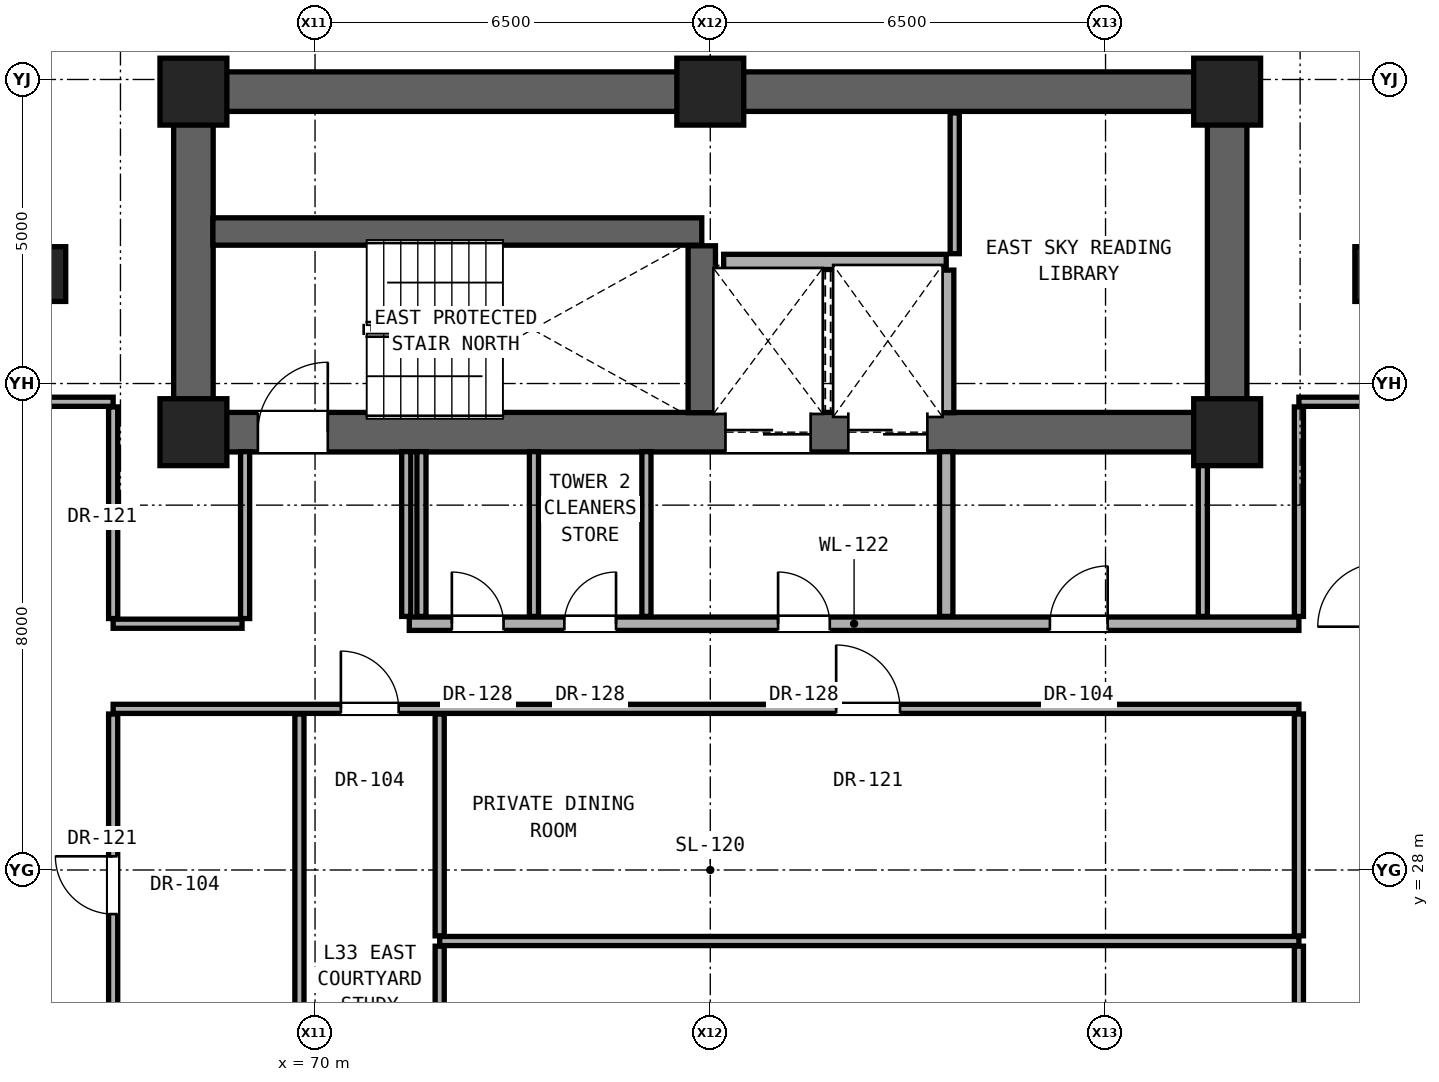
"""IFC4 building model, lengths in metres.
Left out: names, types, materials, properties, quantities, classifications, styles, units other than length and angle.
Written with IfcOpenShell. Run it as: python <this file> out.ifc"""

import sys

from ifc_helpers import new_model, si_unit, direction, frame, frame_2d, origin, origin_2d, place, context, subcontext, project, spatial, rectangle, extrude, element, fill, save


model = new_model("IFC4")
c1 = context("Model", 3, precision=1e-05, world=origin(), true_north=direction((0.0, 1.0)))
c2 = subcontext(c1, "Body", "Model", "MODEL_VIEW")
j1 = project(units=[si_unit("LENGTHUNIT", "METRE"), si_unit("PLANEANGLEUNIT", "RADIAN")], contexts=[c1])
p1 = place(None, origin())
s1 = spatial("IfcSite", under=j1, at=p1, CompositionType="ELEMENT")
p2 = place(p1, origin())
s2 = spatial("IfcBuilding", under=s1, at=p2, CompositionType="ELEMENT")
p3 = place(p2, frame((0.0, 0.0, 118.1)))
s3 = spatial("IfcBuildingStorey", under=s2, at=p3, CompositionType="ELEMENT", Elevation=118.1)
for number, where, z_axis, x_axis in (
    (1, (68.0, 35.2, 0.0), (0.0, 0.0, 1.0), (1.0, 0.0, 0.0)),
    (2, (85.0, 35.2, 0.0), (0.0, 0.0, 1.0), (1.0, 0.0, 0.0)),
    (3, (68.0, 40.8, 0.0), (0.0, 0.0, 1.0), (1.0, 0.0, 0.0)),
    (4, (76.5, 40.8, 0.0), (0.0, 0.0, 1.0), (1.0, 0.0, 0.0)),
    (5, (85.0, 40.8, 0.0), (0.0, 0.0, 1.0), (1.0, 0.0, 0.0)),
):
    element("IfcColumn", number, at=place(p3, frame(where, z_axis=z_axis, x_axis=x_axis)), inside=s3, PredefinedType="COLUMN", context=c2, shape_type="SweptSolid", body=[
        extrude(rectangle(XDim=1.1, YDim=1.1, at=origin_2d()), origin(), (0.0, 0.0, 1.0), 3.3),
    ])
for number, where, z_axis, x_axis in (
    (6, (65.6, 37.8, 0.0), (0.0, 0.0, 1.0), (1.0, 0.0, 0.0)),
    (7, (87.4, 37.8, 0.0), (0.0, 0.0, 1.0), (1.0, 0.0, 0.0)),
):
    element("IfcColumn", number, at=place(p3, frame(where, z_axis=z_axis, x_axis=x_axis)), inside=s3, PredefinedType="PILASTER", context=c2, shape_type="SweptSolid", body=[
        extrude(rectangle(XDim=0.6, YDim=0.9, at=origin_2d()), origin(), (0.0, 0.0, 1.0), 3.3),
    ])
p4 = place(p3, frame((68.0, 40.8, 0.0), z_axis=(0.0, 0.0, 1.0), x_axis=(1.0, 0.0, 0.0)))
e8 = element("IfcWall", 8, at=p4, inside=s3, PredefinedType="SHEAR", context=c2, shape_type="SweptSolid", body=[
    extrude(rectangle(XDim=17.0, YDim=0.65, at=frame_2d((8.5, 0.0))), origin(), (0.0, 0.0, 1.0), 3.08),
])
for number, where, z_axis, x_axis in (
    (9, (68.0, 35.2, 0.0), (0.0, 0.0, 1.0), (0.0, 1.0, 0.0)),
    (10, (85.0, 35.2, 0.0), (0.0, 0.0, 1.0), (0.0, 1.0, 0.0)),
):
    element("IfcWall", number, at=place(p3, frame(where, z_axis=z_axis, x_axis=x_axis)), inside=s3, PredefinedType="SHEAR", context=c2, shape_type="SweptSolid", body=[
        extrude(rectangle(XDim=5.6, YDim=0.65, at=frame_2d((2.8, 0.0))), origin(), (0.0, 0.0, 1.0), 3.08),
    ])
p5 = place(p3, frame((68.0, 35.2, 0.0), z_axis=(0.0, 0.0, 1.0), x_axis=(1.0, 0.0, 0.0)))
e11 = element("IfcWall", 11, at=p5, inside=s3, PredefinedType="SHEAR", context=c2, shape_type="SweptSolid", body=[
    extrude(rectangle(XDim=17.0, YDim=0.65, at=frame_2d((8.5, 0.0))), origin(), (0.0, 0.0, 1.0), 3.08),
])
p6 = place(p5, frame((1.06, 0.0, 0.0)))
e12 = element("IfcOpeningElement", 12, at=p6, cuts=e11, PredefinedType="OPENING", context=c2, shape_type="SweptSolid", body=[
    extrude(rectangle(XDim=1.15, YDim=2.2, at=frame_2d((0.575, 1.1))), frame((0.0, 0.335, 0.0), z_axis=(0.0, -1.0, 0.0), x_axis=(1.0, 0.0, 0.0)), (0.0, 0.0, 1.0), 0.67),
])
p7 = place(p5, frame((8.75, 0.0, 0.0)))
e13 = element("IfcOpeningElement", 13, at=p7, cuts=e11, PredefinedType="OPENING", context=c2, shape_type="SweptSolid", body=[
    extrude(rectangle(XDim=1.4, YDim=2.35, at=frame_2d((0.7, 1.175))), frame((0.0, 0.335, 0.0), z_axis=(0.0, -1.0, 0.0), x_axis=(1.0, 0.0, 0.0)), (0.0, 0.0, 1.0), 0.67),
])
p8 = place(p5, frame((10.77, 0.0, 0.0)))
e14 = element("IfcOpeningElement", 14, at=p8, cuts=e11, PredefinedType="OPENING", context=c2, shape_type="SweptSolid", body=[
    extrude(rectangle(XDim=1.3, YDim=2.3, at=frame_2d((0.65, 1.15))), frame((0.0, 0.335, 0.0), z_axis=(0.0, -1.0, 0.0), x_axis=(1.0, 0.0, 0.0)), (0.0, 0.0, 1.0), 0.67),
])
p9 = place(p3, frame((72.05, 26.832, 0.0), z_axis=(0.0, 0.0, 1.0), x_axis=(1.0, 0.0, 0.0)))
e15 = element("IfcWall", 15, at=p9, inside=s3, PredefinedType="PARTITIONING", context=c2, shape_type="SweptSolid", body=[
    extrude(rectangle(XDim=14.13, YDim=0.15, at=frame_2d((7.065, 0.0))), origin(), (0.0, 0.0, 1.0), 2.216),
])
p10 = place(p3, frame((66.68, 30.65, 0.0), z_axis=(0.0, 0.0, 1.0), x_axis=(1.0, 0.0, 0.0)))
e16 = element("IfcWall", 16, at=p10, inside=s3, PredefinedType="PARTITIONING", context=c2, shape_type="SweptSolid", body=[
    extrude(rectangle(XDim=19.5, YDim=0.15, at=frame_2d((9.75, 0.0))), origin(), (0.0, 0.0, 1.0), 2.216),
])
p11 = place(p10, frame((3.745, 0.0, 0.0)))
e17 = element("IfcOpeningElement", 17, at=p11, cuts=e16, PredefinedType="OPENING", context=c2, shape_type="SweptSolid", body=[
    extrude(rectangle(XDim=0.95, YDim=2.15, at=frame_2d((0.475, 1.075))), frame((0.0, 0.085, 0.0), z_axis=(0.0, -1.0, 0.0), x_axis=(1.0, 0.0, 0.0)), (0.0, 0.0, 1.0), 0.17),
])
p12 = place(p10, frame((11.89, 0.0, 0.0)))
e18 = element("IfcOpeningElement", 18, at=p12, cuts=e16, PredefinedType="OPENING", context=c2, shape_type="SweptSolid", body=[
    extrude(rectangle(XDim=1.05, YDim=2.2, at=frame_2d((0.525, 1.1))), frame((0.0, 0.085, 0.0), z_axis=(0.0, -1.0, 0.0), x_axis=(1.0, 0.0, 0.0)), (0.0, 0.0, 1.0), 0.17),
])
p13 = place(p3, frame((66.68, 32.05, 0.0), z_axis=(0.0, 0.0, 1.0), x_axis=(1.0, 0.0, 0.0)))
e19 = element("IfcWall", 19, at=p13, inside=s3, PredefinedType="PARTITIONING", context=c2, shape_type="SweptSolid", body=[
    extrude(rectangle(XDim=2.12, YDim=0.15, at=frame_2d((1.06, 0.0))), origin(), (0.0, 0.0, 1.0), 2.216),
])
p14 = place(p3, frame((71.55, 32.05, 0.0), z_axis=(0.0, 0.0, 1.0), x_axis=(1.0, 0.0, 0.0)))
e20 = element("IfcWall", 20, at=p14, inside=s3, PredefinedType="SOLIDWALL", context=c2, shape_type="SweptSolid", body=[
    extrude(rectangle(XDim=14.63, YDim=0.22, at=frame_2d((7.315, 0.0))), origin(), (0.0, 0.0, 1.0), 2.216),
])
p15 = place(p14, frame((6.065, 0.0, 0.0)))
e21 = element("IfcOpeningElement", 21, at=p15, cuts=e20, PredefinedType="OPENING", context=c2, shape_type="SweptSolid", body=[
    extrude(rectangle(XDim=0.85, YDim=2.01, at=frame_2d((0.425, 1.005))), frame((0.0, 0.12, 0.0), z_axis=(0.0, -1.0, 0.0), x_axis=(1.0, 0.0, 0.0)), (0.0, 0.0, 1.0), 0.24),
])
p16 = place(p14, frame((10.535, 0.0, 0.0)))
e22 = element("IfcOpeningElement", 22, at=p16, cuts=e20, PredefinedType="OPENING", context=c2, shape_type="SweptSolid", body=[
    extrude(rectangle(XDim=0.95, YDim=2.15, at=frame_2d((0.475, 1.075))), frame((0.0, 0.12, 0.0), z_axis=(0.0, -1.0, 0.0), x_axis=(1.0, 0.0, 0.0)), (0.0, 0.0, 1.0), 0.24),
])
p17 = place(p14, frame((0.7, 0.0, 0.0)))
e23 = element("IfcOpeningElement", 23, at=p17, cuts=e20, PredefinedType="OPENING", context=c2, shape_type="SweptSolid", body=[
    extrude(rectangle(XDim=0.85, YDim=2.01, at=frame_2d((0.425, 1.005))), frame((0.0, 0.12, 0.0), z_axis=(0.0, -1.0, 0.0), x_axis=(1.0, 0.0, 0.0)), (0.0, 0.0, 1.0), 0.24),
])
p18 = place(p14, frame((2.55, 0.0, 0.0)))
e24 = element("IfcOpeningElement", 24, at=p18, cuts=e20, PredefinedType="OPENING", context=c2, shape_type="SweptSolid", body=[
    extrude(rectangle(XDim=0.85, YDim=2.01, at=frame_2d((0.425, 1.005))), frame((0.0, 0.12, 0.0), z_axis=(0.0, -1.0, 0.0), x_axis=(1.0, 0.0, 0.0)), (0.0, 0.0, 1.0), 0.24),
])
p19 = place(p3, frame((65.32, 35.7, 0.0), z_axis=(0.0, 0.0, 1.0), x_axis=(1.0, 0.0, 0.0)))
e25 = element("IfcWall", 25, at=p19, inside=s3, PredefinedType="PARTITIONING", context=c2, shape_type="SweptSolid", body=[
    extrude(rectangle(XDim=1.36, YDim=0.15, at=frame_2d((0.68, 0.0))), origin(), (0.0, 0.0, 1.0), 3.08),
])
p20 = place(p3, frame((86.18, 35.7, 0.0), z_axis=(0.0, 0.0, 1.0), x_axis=(1.0, 0.0, 0.0)))
e26 = element("IfcWall", 26, at=p20, inside=s3, PredefinedType="PARTITIONING", context=c2, shape_type="SweptSolid", body=[
    extrude(rectangle(XDim=1.36, YDim=0.15, at=frame_2d((0.68, 0.0))), origin(), (0.0, 0.0, 1.0), 3.08),
])
p21 = place(p3, frame((76.72, 38.0, 0.0), z_axis=(0.0, 0.0, 1.0), x_axis=(1.0, 0.0, 0.0)))
e27 = element("IfcWall", 27, at=p21, inside=s3, PredefinedType="SOLIDWALL", context=c2, shape_type="SweptSolid", body=[
    extrude(rectangle(XDim=3.66, YDim=0.25, at=frame_2d((1.83, 0.0))), origin(), (0.0, 0.0, 1.0), 3.08),
])
p22 = place(p3, frame((68.32, 38.5, 0.0), z_axis=(0.0, 0.0, 1.0), x_axis=(1.0, 0.0, 0.0)))
e28 = element("IfcWall", 28, at=p22, inside=s3, PredefinedType="SHEAR", context=c2, shape_type="SweptSolid", body=[
    extrude(rectangle(XDim=8.04, YDim=0.45, at=frame_2d((4.02, 0.0))), origin(), (0.0, 0.0, 1.0), 3.08),
])
p23 = place(p3, frame((66.68, 24.935, 0.0), z_axis=(0.0, 0.0, 1.0), x_axis=(0.0, 1.0, 0.0)))
e29 = element("IfcWall", 29, at=p23, inside=s3, PredefinedType="PARTITIONING", context=c2, shape_type="SweptSolid", body=[
    extrude(rectangle(XDim=5.63, YDim=0.15, at=frame_2d((2.815, 0.0))), origin(), (0.0, 0.0, 1.0), 2.376),
])
p24 = place(p23, frame((2.34, 0.0, 0.0)))
e30 = element("IfcOpeningElement", 30, at=p24, cuts=e29, PredefinedType="OPENING", context=c2, shape_type="SweptSolid", body=[
    extrude(rectangle(XDim=0.95, YDim=2.15, at=frame_2d((0.475, 1.075))), frame((0.0, 0.085, 0.0), z_axis=(0.0, -1.0, 0.0), x_axis=(1.0, 0.0, 0.0)), (0.0, 0.0, 1.0), 0.17),
])
p25 = place(p3, frame((66.68, 32.135, 0.0), z_axis=(0.0, 0.0, 1.0), x_axis=(0.0, 1.0, 0.0)))
e31 = element("IfcWall", 31, at=p25, inside=s3, PredefinedType="PARTITIONING", context=c2, shape_type="SweptSolid", body=[
    extrude(rectangle(XDim=3.48, YDim=0.15, at=frame_2d((1.74, 0.0))), origin(), (0.0, 0.0, 1.0), 2.472),
])
p26 = place(p3, frame((68.85, 32.135, 0.0), z_axis=(0.0, 0.0, 1.0), x_axis=(0.0, 1.0, 0.0)))
e32 = element("IfcWall", 32, at=p26, inside=s3, PredefinedType="PARTITIONING", context=c2, shape_type="SweptSolid", body=[
    extrude(rectangle(XDim=2.745, YDim=0.15, at=frame_2d((1.373, 0.0))), origin(), (0.0, 0.0, 1.0), 3.08),
])
p27 = place(p3, frame((69.743, 24.935, 0.0), z_axis=(0.0, 0.0, 1.0), x_axis=(0.0, 1.0, 0.0)))
e33 = element("IfcWall", 33, at=p27, inside=s3, PredefinedType="PARTITIONING", context=c2, shape_type="SweptSolid", body=[
    extrude(rectangle(XDim=5.63, YDim=0.15, at=frame_2d((2.815, 0.0))), origin(), (0.0, 0.0, 1.0), 2.216),
])
for number, where, z_axis, x_axis in (
    (34, (71.5, 32.17, 0.0), (0.0, 0.0, 1.0), (0.0, 1.0, 0.0)),
    (35, (71.75, 32.17, 0.0), (0.0, 0.0, 1.0), (0.0, 1.0, 0.0)),
):
    element("IfcWall", number, at=place(p3, frame(where, z_axis=z_axis, x_axis=x_axis)), inside=s3, PredefinedType="PARTITIONING", context=c2, shape_type="SweptSolid", body=[
        extrude(rectangle(XDim=2.71, YDim=0.15, at=frame_2d((1.355, 0.0))), origin(), (0.0, 0.0, 1.0), 3.08),
    ])
p28 = place(p3, frame((72.05, 22.435, 0.0), z_axis=(0.0, 0.0, 1.0), x_axis=(0.0, 1.0, 0.0)))
e36 = element("IfcWall", 36, at=p28, inside=s3, PredefinedType="PARTITIONING", context=c2, shape_type="SweptSolid", body=[
    extrude(rectangle(XDim=4.312, YDim=0.15, at=frame_2d((2.156, 0.0))), origin(), (0.0, 0.0, 1.0), 3.08),
])
p29 = place(p3, frame((72.05, 26.917, 0.0), z_axis=(0.0, 0.0, 1.0), x_axis=(0.0, 1.0, 0.0)))
e37 = element("IfcWall", 37, at=p29, inside=s3, PredefinedType="PARTITIONING", context=c2, shape_type="SweptSolid", body=[
    extrude(rectangle(XDim=3.648, YDim=0.15, at=frame_2d((1.824, 0.0))), origin(), (0.0, 0.0, 1.0), 2.216),
])
for number, where, z_axis, x_axis in (
    (38, (73.6, 32.17, 0.0), (0.0, 0.0, 1.0), (0.0, 1.0, 0.0)),
    (39, (75.45, 32.17, 0.0), (0.0, 0.0, 1.0), (0.0, 1.0, 0.0)),
):
    element("IfcWall", number, at=place(p3, frame(where, z_axis=z_axis, x_axis=x_axis)), inside=s3, PredefinedType="PARTITIONING", context=c2, shape_type="SweptSolid", body=[
        extrude(rectangle(XDim=2.71, YDim=0.15, at=frame_2d((1.355, 0.0))), origin(), (0.0, 0.0, 1.0), 3.08),
    ])
p30 = place(p3, frame((76.36, 35.52, 0.0), z_axis=(0.0, 0.0, 1.0), x_axis=(0.0, 1.0, 0.0)))
e40 = element("IfcWall", 40, at=p30, inside=s3, PredefinedType="SHEAR", context=c2, shape_type="SweptSolid", body=[
    extrude(rectangle(XDim=2.745, YDim=0.45, at=frame_2d((1.373, 0.0))), origin(), (0.0, 0.0, 1.0), 3.08),
])
p31 = place(p3, frame((80.38, 32.17, 0.0), z_axis=(0.0, 0.0, 1.0), x_axis=(0.0, 1.0, 0.0)))
e41 = element("IfcWall", 41, at=p31, inside=s3, PredefinedType="SOLIDWALL", context=c2, shape_type="SweptSolid", body=[
    extrude(rectangle(XDim=2.71, YDim=0.22, at=frame_2d((1.355, 0.0))), origin(), (0.0, 0.0, 1.0), 3.08),
])
p32 = place(p3, frame((80.38, 35.52, 0.0), z_axis=(0.0, 0.0, 1.0), x_axis=(0.0, 1.0, 0.0)))
e42 = element("IfcWall", 42, at=p32, inside=s3, PredefinedType="SOLIDWALL", context=c2, shape_type="SweptSolid", body=[
    extrude(rectangle(XDim=2.345, YDim=0.25, at=frame_2d((1.172, 0.0))), origin(), (0.0, 0.0, 1.0), 3.08),
])
p33 = place(p3, frame((80.52, 38.135, 0.0), z_axis=(0.0, 0.0, 1.0), x_axis=(0.0, 1.0, 0.0)))
e43 = element("IfcWall", 43, at=p33, inside=s3, PredefinedType="PARTITIONING", context=c2, shape_type="SweptSolid", body=[
    extrude(rectangle(XDim=2.315, YDim=0.15, at=frame_2d((1.157, 0.0))), origin(), (0.0, 0.0, 1.0), 3.08),
])
p34 = place(p3, frame((84.6, 32.17, 0.0), z_axis=(0.0, 0.0, 1.0), x_axis=(0.0, 1.0, 0.0)))
e44 = element("IfcWall", 44, at=p34, inside=s3, PredefinedType="PARTITIONING", context=c2, shape_type="SweptSolid", body=[
    extrude(rectangle(XDim=2.71, YDim=0.15, at=frame_2d((1.355, 0.0))), origin(), (0.0, 0.0, 1.0), 3.08),
])
p35 = place(p3, frame((86.18, 22.435, 0.0), z_axis=(0.0, 0.0, 1.0), x_axis=(0.0, 1.0, 0.0)))
e45 = element("IfcWall", 45, at=p35, inside=s3, PredefinedType="PARTITIONING", context=c2, shape_type="SweptSolid", body=[
    extrude(rectangle(XDim=4.312, YDim=0.15, at=frame_2d((2.156, 0.0))), origin(), (0.0, 0.0, 1.0), 3.08),
])
p36 = place(p3, frame((86.18, 26.917, 0.0), z_axis=(0.0, 0.0, 1.0), x_axis=(0.0, 1.0, 0.0)))
e46 = element("IfcWall", 46, at=p36, inside=s3, PredefinedType="PARTITIONING", context=c2, shape_type="SweptSolid", body=[
    extrude(rectangle(XDim=3.648, YDim=0.15, at=frame_2d((1.824, 0.0))), origin(), (0.0, 0.0, 1.0), 2.376),
])
p37 = place(p3, frame((86.18, 32.17, 0.0), z_axis=(0.0, 0.0, 1.0), x_axis=(0.0, 1.0, 0.0)))
e47 = element("IfcWall", 47, at=p37, inside=s3, PredefinedType="PARTITIONING", context=c2, shape_type="SweptSolid", body=[
    extrude(rectangle(XDim=3.445, YDim=0.15, at=frame_2d((1.723, 0.0))), origin(), (0.0, 0.0, 1.0), 2.472),
])
p38 = place(p6, origin())
e48 = element("IfcDoor", 48, at=p38, inside=s3, OperationType="SINGLE_SWING_RIGHT", PredefinedType="DOOR", context=c2, shape_type="SweptSolid", body=[
    extrude(rectangle(XDim=1.15, YDim=2.2, at=frame_2d((0.575, 1.1))), frame((0.0, 0.025, 0.0), z_axis=(0.0, -1.0, 0.0), x_axis=(1.0, 0.0, 0.0)), (0.0, 0.0, 1.0), 0.05),
])
fill(e12, e48)
p39 = place(p15, origin())
e49 = element("IfcDoor", 49, at=p39, inside=s3, OperationType="SINGLE_SWING_LEFT", PredefinedType="DOOR", context=c2, shape_type="SweptSolid", body=[
    extrude(rectangle(XDim=0.85, YDim=2.01, at=frame_2d((0.425, 1.005))), frame((0.0, 0.025, 0.0), z_axis=(0.0, -1.0, 0.0), x_axis=(1.0, 0.0, 0.0)), (0.0, 0.0, 1.0), 0.05),
])
fill(e21, e49)
p40 = place(p16, origin())
e50 = element("IfcDoor", 50, at=p40, inside=s3, OperationType="SINGLE_SWING_RIGHT", PredefinedType="DOOR", context=c2, shape_type="SweptSolid", body=[
    extrude(rectangle(XDim=0.95, YDim=2.15, at=frame_2d((0.475, 1.075))), frame((0.0, 0.025, 0.0), z_axis=(0.0, -1.0, 0.0), x_axis=(1.0, 0.0, 0.0)), (0.0, 0.0, 1.0), 0.05),
])
fill(e22, e50)
p41 = place(p17, origin())
e51 = element("IfcDoor", 51, at=p41, inside=s3, OperationType="SINGLE_SWING_LEFT", PredefinedType="DOOR", context=c2, shape_type="SweptSolid", body=[
    extrude(rectangle(XDim=0.85, YDim=2.01, at=frame_2d((0.425, 1.005))), frame((0.0, 0.025, 0.0), z_axis=(0.0, -1.0, 0.0), x_axis=(1.0, 0.0, 0.0)), (0.0, 0.0, 1.0), 0.05),
])
fill(e23, e51)
p42 = place(p18, origin())
e52 = element("IfcDoor", 52, at=p42, inside=s3, OperationType="SINGLE_SWING_RIGHT", PredefinedType="DOOR", context=c2, shape_type="SweptSolid", body=[
    extrude(rectangle(XDim=0.85, YDim=2.01, at=frame_2d((0.425, 1.005))), frame((0.0, 0.025, 0.0), z_axis=(0.0, -1.0, 0.0), x_axis=(1.0, 0.0, 0.0)), (0.0, 0.0, 1.0), 0.05),
])
fill(e24, e52)
p43 = place(p24, origin())
e53 = element("IfcDoor", 53, at=p43, inside=s3, OperationType="SINGLE_SWING_RIGHT", PredefinedType="DOOR", context=c2, shape_type="SweptSolid", body=[
    extrude(rectangle(XDim=0.95, YDim=2.15, at=frame_2d((0.475, 1.075))), frame((0.0, 0.025, 0.0), z_axis=(0.0, -1.0, 0.0), x_axis=(1.0, 0.0, 0.0)), (0.0, 0.0, 1.0), 0.05),
])
fill(e30, e53)
p44 = place(p11, origin())
e54 = element("IfcDoor", 54, at=p44, inside=s3, OperationType="SINGLE_SWING_LEFT", PredefinedType="DOOR", context=c2, shape_type="SweptSolid", body=[
    extrude(rectangle(XDim=0.95, YDim=2.15, at=frame_2d((0.475, 1.075))), frame((0.0, 0.025, 0.0), z_axis=(0.0, -1.0, 0.0), x_axis=(1.0, 0.0, 0.0)), (0.0, 0.0, 1.0), 0.05),
])
fill(e17, e54)
p45 = place(p12, origin())
e55 = element("IfcDoor", 55, at=p45, inside=s3, OperationType="SINGLE_SWING_LEFT", PredefinedType="DOOR", context=c2, shape_type="SweptSolid", body=[
    extrude(rectangle(XDim=1.05, YDim=2.2, at=frame_2d((0.525, 1.1))), frame((0.0, 0.025, 0.0), z_axis=(0.0, -1.0, 0.0), x_axis=(1.0, 0.0, 0.0)), (0.0, 0.0, 1.0), 0.05),
])
fill(e18, e55)
p46 = place(p7, origin())
e56 = element("IfcDoor", 56, at=p46, inside=s3, OperationType="DOUBLE_DOOR_SLIDING", PredefinedType="DOOR", context=c2, shape_type="SweptSolid", body=[
    extrude(rectangle(XDim=1.4, YDim=2.35, at=frame_2d((0.7, 1.175))), frame((0.0, 0.025, 0.0), z_axis=(0.0, -1.0, 0.0), x_axis=(1.0, 0.0, 0.0)), (0.0, 0.0, 1.0), 0.05),
])
fill(e13, e56)
p47 = place(p8, origin())
e57 = element("IfcDoor", 57, at=p47, inside=s3, OperationType="DOUBLE_DOOR_SLIDING", PredefinedType="DOOR", context=c2, shape_type="SweptSolid", body=[
    extrude(rectangle(XDim=1.3, YDim=2.3, at=frame_2d((0.65, 1.15))), frame((0.0, 0.025, 0.0), z_axis=(0.0, -1.0, 0.0), x_axis=(1.0, 0.0, 0.0)), (0.0, 0.0, 1.0), 0.05),
])
fill(e14, e57)
save(model, sys.argv[1])
